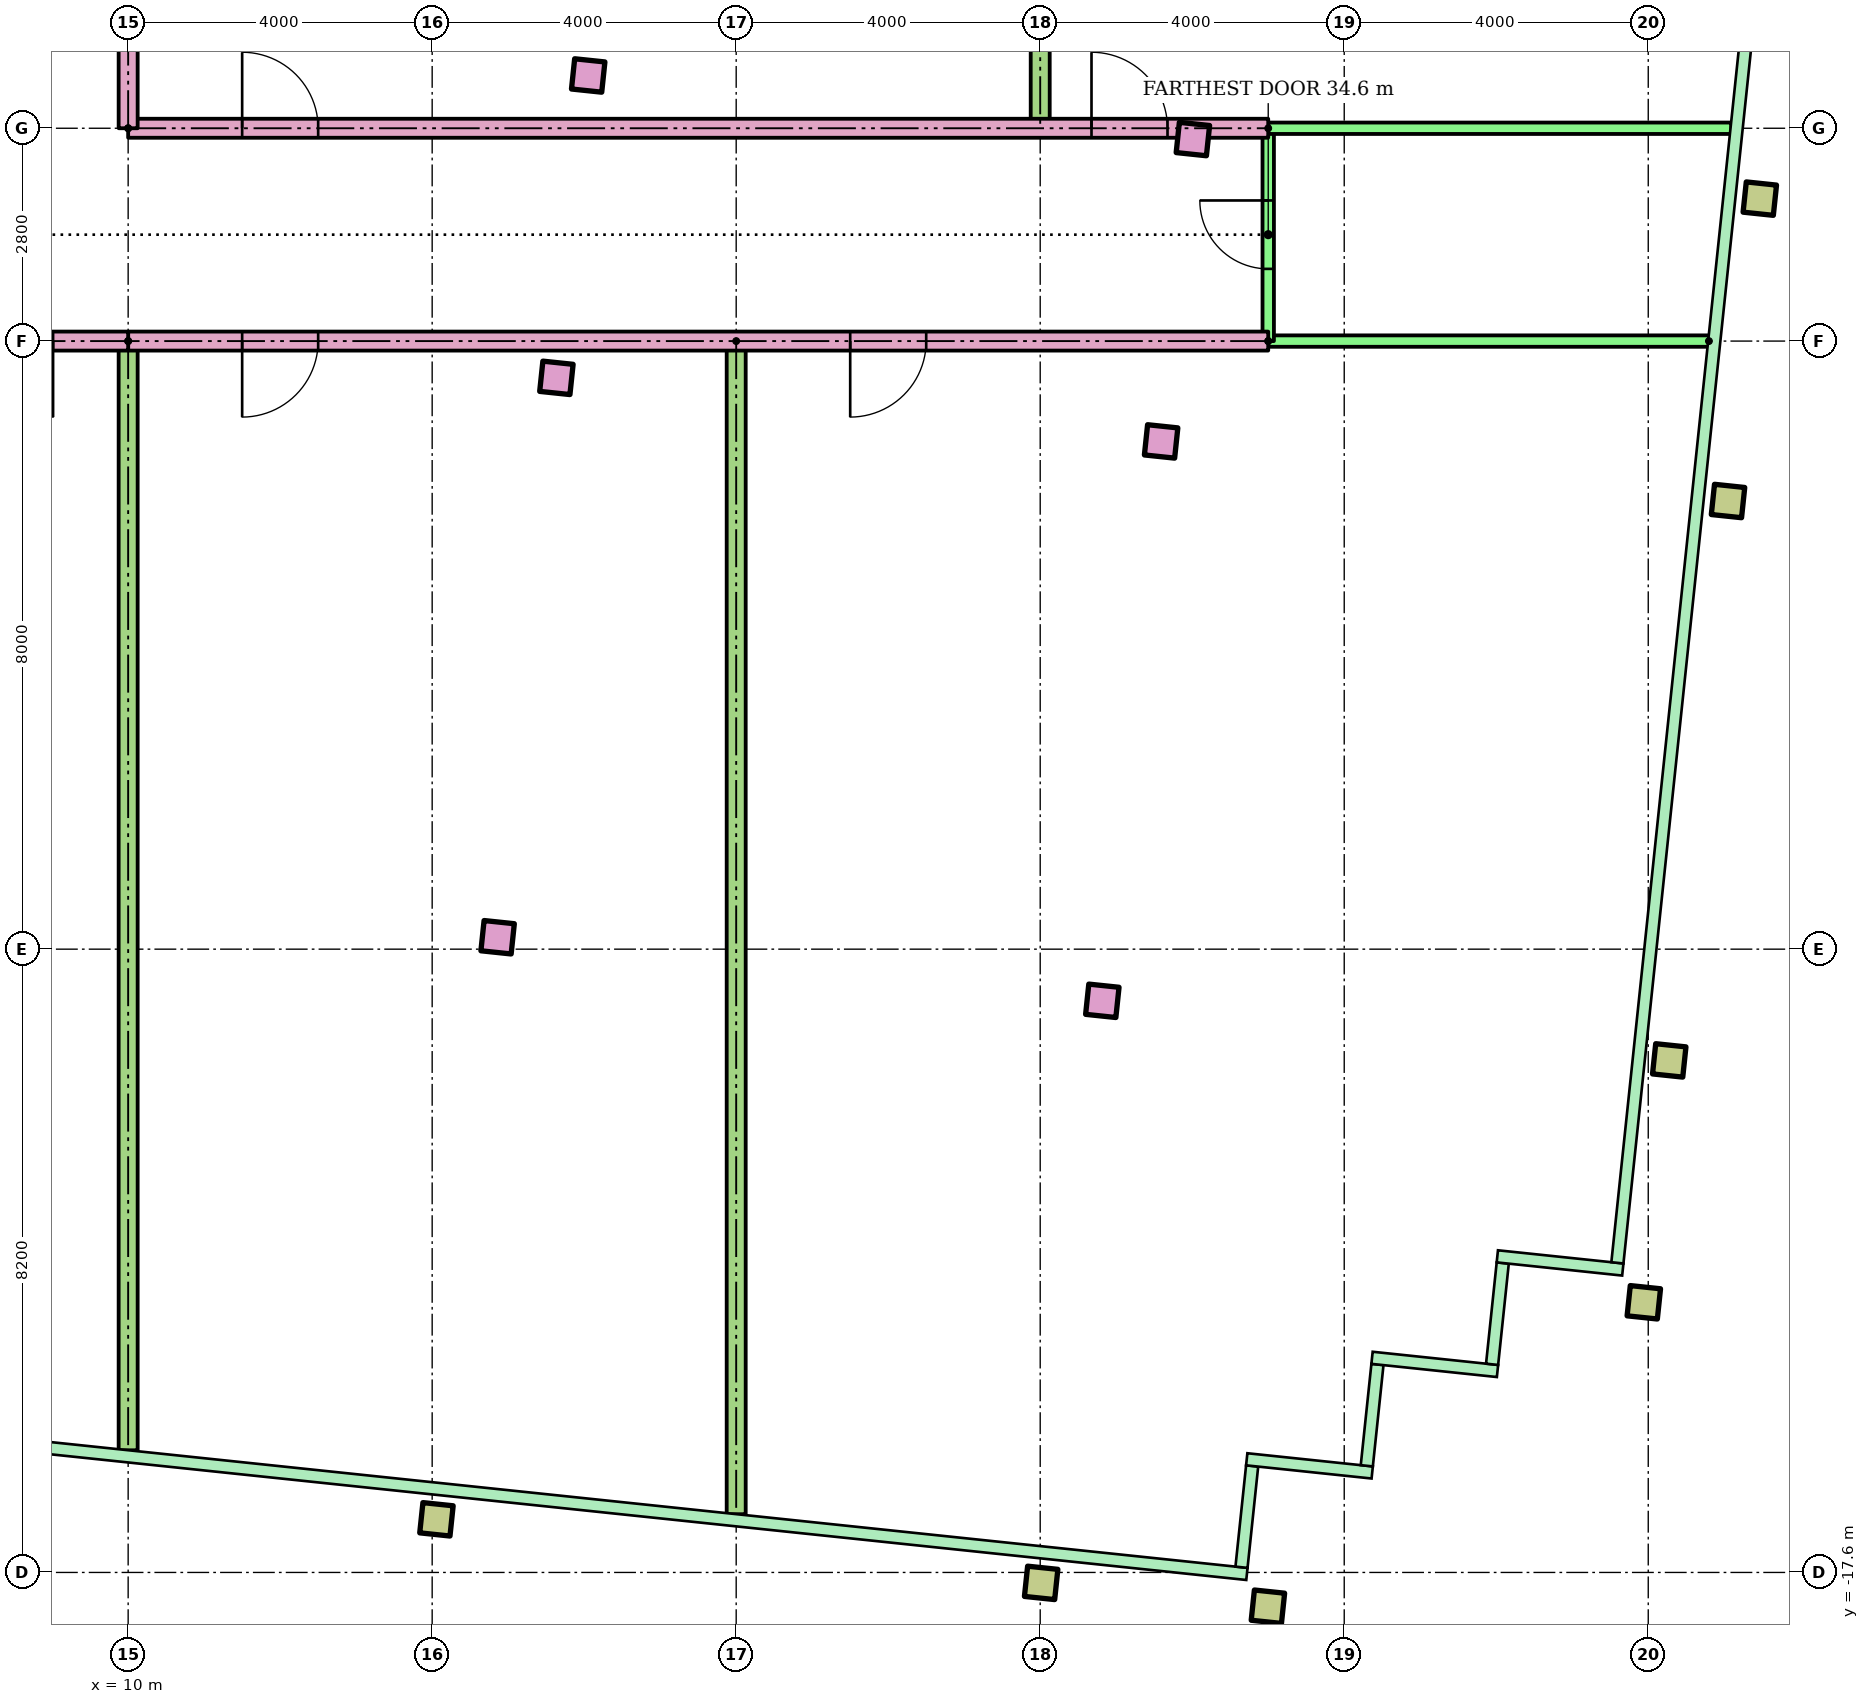
"""IFC4 building model, lengths in metres.
Left out: names, types, materials, properties, quantities, classifications, styles, units other than length and angle.
Written with IfcOpenShell. Run it as: python <this file> out.ifc"""

import sys

from ifc_helpers import new_model, si_unit, direction, frame, frame_2d, origin, origin_2d, place, context, subcontext, project, spatial, rectangle, hollow_rectangle, extrude, element, fill, save


model = new_model("IFC4")
c1 = context("Model", 3, precision=1e-05, world=origin(), true_north=direction((0.0, 1.0)))
c2 = subcontext(c1, "Body", "Model", "MODEL_VIEW")
j1 = project(units=[si_unit("LENGTHUNIT", "METRE"), si_unit("PLANEANGLEUNIT", "RADIAN")], contexts=[c1])
p1 = place(None, origin())
s1 = spatial("IfcSite", under=j1, at=p1, CompositionType="ELEMENT")
p2 = place(p1, origin())
s2 = spatial("IfcBuilding", under=s1, at=p2, CompositionType="ELEMENT")
p3 = place(p2, frame((0.0, 0.0, 291.5)))
s3 = spatial("IfcBuildingStorey", under=s2, at=p3, CompositionType="ELEMENT", Elevation=291.5)
for number, where, z_axis, x_axis in (
    (1, (14.056, -16.901, 0.0), (0.0, 0.0, 1.0), (0.995, -0.105, 0.0)),
    (2, (22.012, -17.737, 0.0), (0.0, 0.0, 1.0), (0.995, -0.105, 0.0)),
    (3, (24.996, -18.051, 0.0), (0.0, 0.0, 1.0), (0.995, -0.105, 0.0)),
    (4, (29.942, -14.046, 0.0), (0.0, 0.0, 1.0), (0.995, -0.105, 0.0)),
):
    element("IfcColumn", number, at=place(p3, frame(where, z_axis=z_axis, x_axis=x_axis)), inside=s3, PredefinedType="COLUMN", context=c2, shape_type="SweptSolid", body=[
        extrude(hollow_rectangle(XDim=0.4, YDim=0.4, WallThickness=0.02, at=origin_2d()), origin(), (0.0, 0.0, 1.0), 3.4),
    ])
for number, where, z_axis, x_axis in (
    (5, (14.861, -9.243, 0.0), (0.0, 0.0, 1.0), (0.995, -0.105, 0.0)),
    (6, (22.817, -10.08, 0.0), (0.0, 0.0, 1.0), (0.995, -0.105, 0.0)),
):
    element("IfcColumn", number, at=place(p3, frame(where, z_axis=z_axis, x_axis=x_axis)), inside=s3, PredefinedType="COLUMN", context=c2, shape_type="SweptSolid", body=[
        extrude(rectangle(XDim=0.4, YDim=0.4, at=origin_2d()), origin(), (0.0, 0.0, 1.0), 3.4),
    ])
p4 = place(p3, frame((30.276, -10.864, 0.0), z_axis=(0.0, 0.0, 1.0), x_axis=(0.994521895368, -0.104528463268, 0.0)))
e7 = element("IfcColumn", 7, at=p4, inside=s3, PredefinedType="COLUMN", context=c2, shape_type="SweptSolid", body=[
    extrude(hollow_rectangle(XDim=0.4, YDim=0.4, WallThickness=0.02, at=origin_2d()), origin(), (0.0, 0.0, 1.0), 3.4),
])
for number, where, z_axis, x_axis in (
    (8, (15.635, -1.884, 0.0), (0.0, 0.0, 1.0), (0.995, -0.105, 0.0)),
    (9, (23.591, -2.72, 0.0), (0.0, 0.0, 1.0), (0.995, -0.105, 0.0)),
):
    element("IfcColumn", number, at=place(p3, frame(where, z_axis=z_axis, x_axis=x_axis)), inside=s3, PredefinedType="COLUMN", context=c2, shape_type="SweptSolid", body=[
        extrude(rectangle(XDim=0.4, YDim=0.4, at=origin_2d()), origin(), (0.0, 0.0, 1.0), 3.4),
    ])
p5 = place(p3, frame((31.05, -3.504, 0.0), z_axis=(0.0, 0.0, 1.0), x_axis=(0.994521895368, -0.104528463268, 0.0)))
e10 = element("IfcColumn", 10, at=p5, inside=s3, PredefinedType="COLUMN", context=c2, shape_type="SweptSolid", body=[
    extrude(hollow_rectangle(XDim=0.4, YDim=0.4, WallThickness=0.02, at=origin_2d()), origin(), (0.0, 0.0, 1.0), 3.4),
])
for number, where, z_axis, x_axis in (
    (11, (16.053, 2.094, 0.0), (0.0, 0.0, 1.0), (0.995, -0.105, 0.0)),
    (12, (24.009, 1.258, 0.0), (0.0, 0.0, 1.0), (0.995, -0.105, 0.0)),
):
    element("IfcColumn", number, at=place(p3, frame(where, z_axis=z_axis, x_axis=x_axis)), inside=s3, PredefinedType="COLUMN", context=c2, shape_type="SweptSolid", body=[
        extrude(rectangle(XDim=0.4, YDim=0.4, at=origin_2d()), origin(), (0.0, 0.0, 1.0), 3.4),
    ])
p6 = place(p3, frame((31.468, 0.474, 0.0), z_axis=(0.0, 0.0, 1.0), x_axis=(0.994521895368, -0.104528463268, 0.0)))
e13 = element("IfcColumn", 13, at=p6, inside=s3, PredefinedType="COLUMN", context=c2, shape_type="SweptSolid", body=[
    extrude(hollow_rectangle(XDim=0.4, YDim=0.4, WallThickness=0.02, at=origin_2d()), origin(), (0.0, 0.0, 1.0), 3.4),
])
p7 = place(p3, frame((25.0, -1.4, 0.0), z_axis=(0.0, 0.0, 1.0), x_axis=(-1.0, 0.0, 0.0)))
e14 = element("IfcWall", 14, at=p7, inside=s3, PredefinedType="PARTITIONING", context=c2, shape_type="SweptSolid", body=[
    extrude(rectangle(XDim=15.0, YDim=0.25, at=frame_2d((7.5, 0.0))), origin(), (0.0, 0.0, 1.0), 2.6),
])
p8 = place(p7, frame((12.5, 0.0, 0.0)))
e15 = element("IfcOpeningElement", 15, at=p8, cuts=e14, PredefinedType="OPENING", context=c2, shape_type="SweptSolid", body=[
    extrude(rectangle(XDim=1.0, YDim=2.1, at=frame_2d((0.5, 1.05))), frame((0.0, 0.135, 0.0), z_axis=(0.0, -1.0, 0.0), x_axis=(1.0, 0.0, 0.0)), (0.0, 0.0, 1.0), 0.27),
])
p9 = place(p7, frame((4.5, 0.0, 0.0)))
e16 = element("IfcOpeningElement", 16, at=p9, cuts=e14, PredefinedType="OPENING", context=c2, shape_type="SweptSolid", body=[
    extrude(rectangle(XDim=1.0, YDim=2.1, at=frame_2d((0.5, 1.05))), frame((0.0, 0.135, 0.0), z_axis=(0.0, -1.0, 0.0), x_axis=(1.0, 0.0, 0.0)), (0.0, 0.0, 1.0), 0.27),
])
p10 = place(p3, frame((30.798, -1.4, 0.0), z_axis=(0.0, 0.0, 1.0), x_axis=(-1.0, 0.0, 0.0)))
e17 = element("IfcWall", 17, at=p10, inside=s3, PredefinedType="PARTITIONING", context=c2, shape_type="SweptSolid", body=[
    extrude(rectangle(XDim=5.798, YDim=0.15, at=frame_2d((2.899, 0.0))), origin(), (0.0, 0.0, 1.0), 2.6),
])
p11 = place(p3, frame((25.0, -1.4, 0.0), z_axis=(0.0, 0.0, 1.0), x_axis=(0.0, 1.0, 0.0)))
e18 = element("IfcWall", 18, at=p11, inside=s3, PredefinedType="PARTITIONING", context=c2, shape_type="SweptSolid", body=[
    extrude(rectangle(XDim=2.8, YDim=0.15, at=frame_2d((1.4, 0.0))), origin(), (0.0, 0.0, 1.0), 2.6),
])
p12 = place(p11, frame((0.95, 0.0, 0.0)))
e19 = element("IfcOpeningElement", 19, at=p12, cuts=e18, PredefinedType="OPENING", context=c2, shape_type="SweptSolid", body=[
    extrude(rectangle(XDim=0.9, YDim=2.1, at=frame_2d((0.45, 1.05))), frame((0.0, 0.085, 0.0), z_axis=(0.0, -1.0, 0.0), x_axis=(1.0, 0.0, 0.0)), (0.0, 0.0, 1.0), 0.17),
])
p13 = place(p3, frame((10.0, -1.4, 0.0), z_axis=(0.0, 0.0, 1.0), x_axis=(0.0, -1.0, 0.0)))
e20 = element("IfcWall", 20, at=p13, inside=s3, PredefinedType="PARTITIONING", context=c2, shape_type="SweptSolid", body=[
    extrude(rectangle(XDim=14.593, YDim=0.25, at=frame_2d((7.297, 0.0))), origin(), (0.0, 0.0, 1.0), 2.6),
])
p14 = place(p3, frame((18.0, -1.4, 0.0), z_axis=(0.0, 0.0, 1.0), x_axis=(0.0, -1.0, 0.0)))
e21 = element("IfcWall", 21, at=p14, inside=s3, PredefinedType="PARTITIONING", context=c2, shape_type="SweptSolid", body=[
    extrude(rectangle(XDim=15.434, YDim=0.25, at=frame_2d((7.717, 0.0))), origin(), (0.0, 0.0, 1.0), 2.6),
])
p15 = place(p3, frame((10.0, 1.4, 0.0)))
e22 = element("IfcWall", 22, at=p15, inside=s3, PredefinedType="PARTITIONING", context=c2, shape_type="SweptSolid", body=[
    extrude(rectangle(XDim=15.0, YDim=0.25, at=frame_2d((7.5, 0.0))), origin(), (0.0, 0.0, 1.0), 2.6),
])
p16 = place(p15, frame((1.5, 0.0, 0.0)))
e23 = element("IfcOpeningElement", 23, at=p16, cuts=e22, PredefinedType="OPENING", context=c2, shape_type="SweptSolid", body=[
    extrude(rectangle(XDim=1.0, YDim=2.1, at=frame_2d((0.5, 1.05))), frame((0.0, 0.135, 0.0), z_axis=(0.0, -1.0, 0.0), x_axis=(1.0, 0.0, 0.0)), (0.0, 0.0, 1.0), 0.27),
])
p17 = place(p15, frame((12.675, 0.0, 0.0)))
e24 = element("IfcOpeningElement", 24, at=p17, cuts=e22, PredefinedType="OPENING", context=c2, shape_type="SweptSolid", body=[
    extrude(rectangle(XDim=1.0, YDim=2.1, at=frame_2d((0.5, 1.05))), frame((0.0, 0.135, 0.0), z_axis=(0.0, -1.0, 0.0), x_axis=(1.0, 0.0, 0.0)), (0.0, 0.0, 1.0), 0.27),
])
p18 = place(p3, frame((25.0, 1.4, 0.0)))
e25 = element("IfcWall", 25, at=p18, inside=s3, PredefinedType="PARTITIONING", context=c2, shape_type="SweptSolid", body=[
    extrude(rectangle(XDim=6.093, YDim=0.15, at=frame_2d((3.046, 0.0))), origin(), (0.0, 0.0, 1.0), 2.6),
])
p19 = place(p3, frame((22.0, 18.584, 0.0), z_axis=(0.0, 0.0, 1.0), x_axis=(0.0, -1.0, 0.0)))
e26 = element("IfcWall", 26, at=p19, inside=s3, PredefinedType="PARTITIONING", context=c2, shape_type="SweptSolid", body=[
    extrude(rectangle(XDim=17.184, YDim=0.25, at=frame_2d((8.592, 0.0))), origin(), (0.0, 0.0, 1.0), 2.6),
])
p20 = place(p3, frame((10.0, -1.4, 0.0), z_axis=(0.0, 0.0, 1.0), x_axis=(-1.0, 0.0, 0.0)))
e27 = element("IfcWall", 27, at=p20, inside=s3, PredefinedType="PARTITIONING", context=c2, shape_type="SweptSolid", body=[
    extrude(rectangle(XDim=20.0, YDim=0.25, at=frame_2d((10.0, 0.0))), origin(), (0.0, 0.0, 1.0), 2.6),
])
p21 = place(p20, frame((8.944, 0.0, 0.0)))
e28 = element("IfcOpeningElement", 28, at=p21, cuts=e27, PredefinedType="OPENING", context=c2, shape_type="SweptSolid", body=[
    extrude(rectangle(XDim=1.0, YDim=2.1, at=frame_2d((0.5, 1.05))), frame((0.0, 0.135, 0.0), z_axis=(0.0, -1.0, 0.0), x_axis=(1.0, 0.0, 0.0)), (0.0, 0.0, 1.0), 0.27),
])
p22 = place(p20, frame((0.988, 0.0, 0.0)))
e29 = element("IfcOpeningElement", 29, at=p22, cuts=e27, PredefinedType="OPENING", context=c2, shape_type="SweptSolid", body=[
    extrude(rectangle(XDim=1.0, YDim=2.1, at=frame_2d((0.5, 1.05))), frame((0.0, 0.135, 0.0), z_axis=(0.0, -1.0, 0.0), x_axis=(1.0, 0.0, 0.0)), (0.0, 0.0, 1.0), 0.27),
])
p23 = place(p3, frame((10.0, 1.4, 0.0), z_axis=(0.0, 0.0, 1.0), x_axis=(0.0, 1.0, 0.0)))
e30 = element("IfcWall", 30, at=p23, inside=s3, PredefinedType="PARTITIONING", context=c2, shape_type="SweptSolid", body=[
    extrude(rectangle(XDim=1.6, YDim=0.25, at=frame_2d((0.8, 0.0))), origin(), (0.0, 0.0, 1.0), 2.6),
])
p24 = place(p8, origin())
e31 = element("IfcDoor", 31, at=p24, inside=s3, OperationType="SINGLE_SWING_RIGHT", PredefinedType="DOOR", context=c2, shape_type="SweptSolid", body=[
    extrude(rectangle(XDim=1.0, YDim=2.1, at=frame_2d((0.5, 1.05))), frame((0.0, 0.025, 0.0), z_axis=(0.0, -1.0, 0.0), x_axis=(1.0, 0.0, 0.0)), (0.0, 0.0, 1.0), 0.05),
])
fill(e15, e31)
p25 = place(p9, origin())
e32 = element("IfcDoor", 32, at=p25, inside=s3, OperationType="SINGLE_SWING_RIGHT", PredefinedType="DOOR", context=c2, shape_type="SweptSolid", body=[
    extrude(rectangle(XDim=1.0, YDim=2.1, at=frame_2d((0.5, 1.05))), frame((0.0, 0.025, 0.0), z_axis=(0.0, -1.0, 0.0), x_axis=(1.0, 0.0, 0.0)), (0.0, 0.0, 1.0), 0.05),
])
fill(e16, e32)
p26 = place(p12, origin())
e33 = element("IfcDoor", 33, at=p26, inside=s3, OperationType="SINGLE_SWING_RIGHT", PredefinedType="DOOR", context=c2, shape_type="SweptSolid", body=[
    extrude(rectangle(XDim=0.9, YDim=2.1, at=frame_2d((0.45, 1.05))), frame((0.0, 0.025, 0.0), z_axis=(0.0, -1.0, 0.0), x_axis=(1.0, 0.0, 0.0)), (0.0, 0.0, 1.0), 0.05),
])
fill(e19, e33)
p27 = place(p16, origin())
e34 = element("IfcDoor", 34, at=p27, inside=s3, OperationType="SINGLE_SWING_LEFT", PredefinedType="DOOR", context=c2, shape_type="SweptSolid", body=[
    extrude(rectangle(XDim=1.0, YDim=2.1, at=frame_2d((0.5, 1.05))), frame((0.0, 0.025, 0.0), z_axis=(0.0, -1.0, 0.0), x_axis=(1.0, 0.0, 0.0)), (0.0, 0.0, 1.0), 0.05),
])
fill(e23, e34)
p28 = place(p17, origin())
e35 = element("IfcDoor", 35, at=p28, inside=s3, OperationType="SINGLE_SWING_LEFT", PredefinedType="DOOR", context=c2, shape_type="SweptSolid", body=[
    extrude(rectangle(XDim=1.0, YDim=2.1, at=frame_2d((0.5, 1.05))), frame((0.0, 0.025, 0.0), z_axis=(0.0, -1.0, 0.0), x_axis=(1.0, 0.0, 0.0)), (0.0, 0.0, 1.0), 0.05),
])
fill(e24, e35)
p29 = place(p22, origin())
e36 = element("IfcDoor", 36, at=p29, inside=s3, OperationType="SINGLE_SWING_LEFT", PredefinedType="DOOR", context=c2, shape_type="SweptSolid", body=[
    extrude(rectangle(XDim=1.0, YDim=2.1, at=frame_2d((0.5, 1.05))), frame((0.0, 0.025, 0.0), z_axis=(0.0, -1.0, 0.0), x_axis=(1.0, 0.0, 0.0)), (0.0, 0.0, 1.0), 0.05),
])
fill(e29, e36)
save(model, sys.argv[1])
